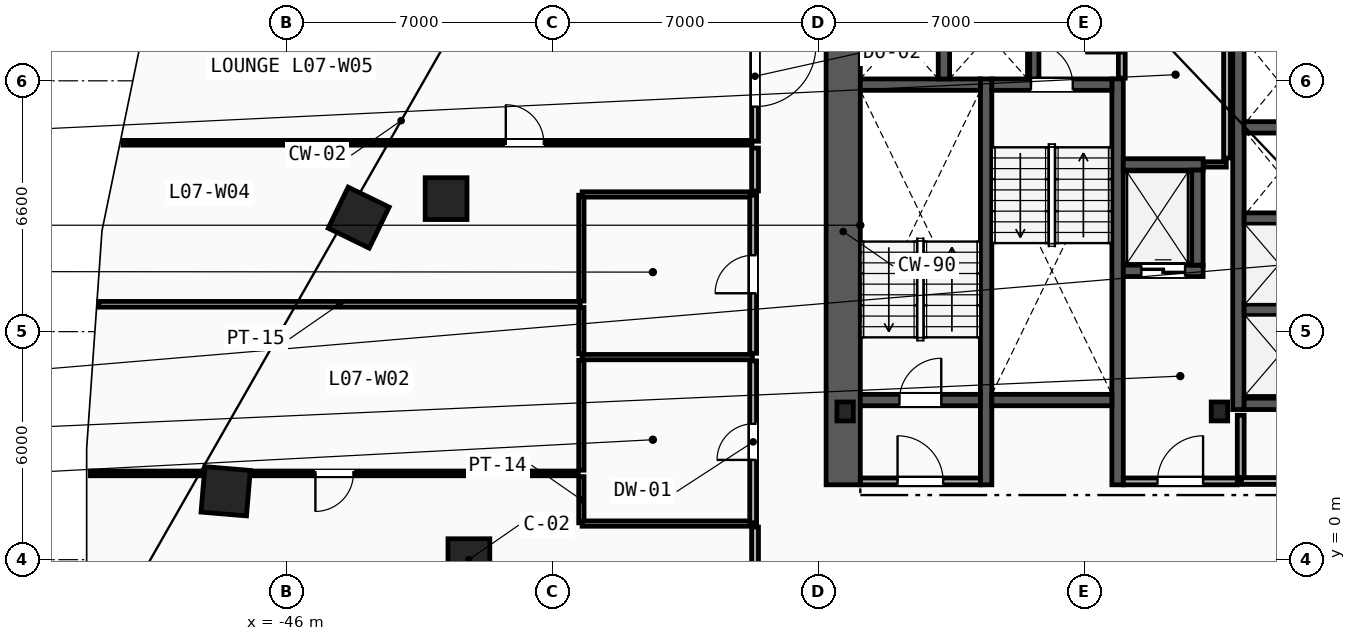
"""IFC4 building model, lengths in metres.
Left out: names, types, materials, properties, quantities, classifications, styles, units other than length and angle.
Written with IfcOpenShell. Run it as: python <this file> out.ifc"""

import sys

from ifc_helpers import new_model, si_unit, direction, frame, frame_2d, origin, origin_2d, place, context, subcontext, project, spatial, rectangle, i_section, extrude, element, fill, save


model = new_model("IFC4")
c1 = context("Model", 3, precision=1e-05, world=origin(), true_north=direction((0.0, 1.0)))
c2 = subcontext(c1, "Body", "Model", "MODEL_VIEW")
j1 = project(units=[si_unit("LENGTHUNIT", "METRE"), si_unit("PLANEANGLEUNIT", "RADIAN")], contexts=[c1])
p1 = place(None, origin())
s1 = spatial("IfcSite", under=j1, at=p1, CompositionType="ELEMENT")
p2 = place(p1, origin())
s2 = spatial("IfcBuilding", under=s1, at=p2, CompositionType="ELEMENT")
p3 = place(p2, frame((0.0, 0.0, 31.6)))
s3 = spatial("IfcBuildingStorey", under=s2, at=p3, CompositionType="ELEMENT", Elevation=31.6)
for number, where, z_axis, x_axis in (
    (1, (-31.3, 3.9, 0.0), (0.0, 0.0, 1.0), (1.0, 0.0, 0.0)),
    (2, (-21.45, 3.9, 0.0), (0.0, 0.0, 1.0), (1.0, 0.0, 0.0)),
):
    element("IfcColumn", number, at=place(p3, frame(where, z_axis=z_axis, x_axis=x_axis)), inside=s3, PredefinedType="COLUMN", context=c2, shape_type="SweptSolid", body=[
        extrude(i_section(OverallWidth=0.432, OverallDepth=0.498, WebThickness=0.056, FlangeThickness=0.089, FilletRadius=0.018, at=origin_2d()), origin(), (0.0, 0.0, 1.0), 3.8),
    ])
for number, where, z_axis, x_axis in (
    (3, (-41.2, 0.0, 0.0), (0.0, 0.0, 1.0), (1.0, 0.0, 0.0)),
    (4, (-41.8, 9.5, 0.0), (0.0, 0.0, 1.0), (1.0, 0.0, 0.0)),
):
    element("IfcColumn", number, at=place(p3, frame(where, z_axis=z_axis, x_axis=x_axis)), inside=s3, PredefinedType="COLUMN", context=c2, shape_type="SweptSolid", body=[
        extrude(rectangle(XDim=1.1, YDim=1.1, at=origin_2d()), origin(), (0.0, 0.0, 1.0), 3.8),
    ])
for number, where, z_axis, x_axis in (
    (5, (-44.1, 9.0, 0.0), (0.0, 0.0, 1.0), (-0.437, -0.899, 0.0)),
    (6, (-47.6, 1.8, 0.0), (0.0, 0.0, 1.0), (-0.084, -0.997, 0.0)),
):
    element("IfcColumn", number, at=place(p3, frame(where, z_axis=z_axis, x_axis=x_axis)), inside=s3, PredefinedType="COLUMN", context=c2, shape_type="SweptSolid", body=[
        extrude(rectangle(XDim=1.2, YDim=1.2, at=origin_2d()), origin(), (0.0, 0.0, 1.0), 3.8),
    ])
p4 = place(p3, frame((-31.35, 1.97, 0.0), z_axis=(0.0, 0.0, 1.0), x_axis=(0.0, 1.0, 0.0)))
e7 = element("IfcWall", 7, at=p4, inside=s3, PredefinedType="SHEAR", context=c2, shape_type="SweptSolid", body=[
    extrude(rectangle(XDim=13.33, YDim=0.9, at=frame_2d((6.665, 0.0))), origin(), (0.0, 0.0, 1.0), 3.5),
])
for number, where, z_axis, x_axis in (
    (8, (-27.59, 1.97, 0.0), (0.0, 0.0, 1.0), (0.0, 1.0, 0.0)),
    (9, (-24.13, 1.97, 0.0), (0.0, 0.0, 1.0), (0.0, 1.0, 0.0)),
):
    element("IfcWall", number, at=place(p3, frame(where, z_axis=z_axis, x_axis=x_axis)), inside=s3, PredefinedType="SHEAR", context=c2, shape_type="SweptSolid", body=[
        extrude(rectangle(XDim=10.68, YDim=0.3, at=frame_2d((5.34, 0.0))), origin(), (0.0, 0.0, 1.0), 3.5),
    ])
p5 = place(p3, frame((-30.9, 4.2, 0.0), z_axis=(0.0, 0.0, 1.0), x_axis=(1.0, 0.0, 0.0)))
e10 = element("IfcWall", 10, at=p5, inside=s3, PredefinedType="SHEAR", context=c2, shape_type="SweptSolid", body=[
    extrude(rectangle(XDim=3.16, YDim=0.3, at=frame_2d((1.58, 0.0))), origin(), (0.0, 0.0, 1.0), 3.5),
])
p6 = place(p5, frame((1.03, 0.0, 0.0)))
e11 = element("IfcOpeningElement", 11, at=p6, cuts=e10, PredefinedType="OPENING", context=c2, shape_type="SweptSolid", body=[
    extrude(rectangle(XDim=1.1, YDim=2.15, at=frame_2d((0.55, 1.075))), frame((0.0, 0.16, 0.0), z_axis=(0.0, -1.0, 0.0), x_axis=(1.0, 0.0, 0.0)), (0.0, 0.0, 1.0), 0.32),
])
p7 = place(p3, frame((-30.9, 12.5, 0.0), z_axis=(0.0, 0.0, 1.0), x_axis=(1.0, 0.0, 0.0)))
e12 = element("IfcWall", 12, at=p7, inside=s3, PredefinedType="SHEAR", context=c2, shape_type="SweptSolid", body=[
    extrude(rectangle(XDim=3.16, YDim=0.3, at=frame_2d((1.58, 0.0))), origin(), (0.0, 0.0, 1.0), 3.5),
])
p8 = place(p3, frame((-27.44, 12.5, 0.0), z_axis=(0.0, 0.0, 1.0), x_axis=(1.0, 0.0, 0.0)))
e13 = element("IfcWall", 13, at=p8, inside=s3, PredefinedType="SHEAR", context=c2, shape_type="SweptSolid", body=[
    extrude(rectangle(XDim=3.16, YDim=0.3, at=frame_2d((1.58, 0.0))), origin(), (0.0, 0.0, 1.0), 3.5),
])
p9 = place(p8, frame((1.03, 0.0, 0.0)))
e14 = element("IfcOpeningElement", 14, at=p9, cuts=e13, PredefinedType="OPENING", context=c2, shape_type="SweptSolid", body=[
    extrude(rectangle(XDim=1.1, YDim=2.15, at=frame_2d((0.55, 1.075))), frame((0.0, 0.16, 0.0), z_axis=(0.0, -1.0, 0.0), x_axis=(1.0, 0.0, 0.0)), (0.0, 0.0, 1.0), 0.32),
])
p10 = place(p3, frame((-27.44, 4.2, 0.0), z_axis=(0.0, 0.0, 1.0), x_axis=(1.0, 0.0, 0.0)))
e15 = element("IfcWall", 15, at=p10, inside=s3, PredefinedType="SHEAR", context=c2, shape_type="SweptSolid", body=[
    extrude(rectangle(XDim=3.16, YDim=0.3, at=frame_2d((1.58, 0.0))), origin(), (0.0, 0.0, 1.0), 3.5),
])
p11 = place(p3, frame((-20.89, 2.15, 0.0), z_axis=(0.0, 0.0, 1.0), x_axis=(0.0, 1.0, 0.0)))
e16 = element("IfcWall", 16, at=p11, inside=s3, PredefinedType="PARTITIONING", context=c2, shape_type="SweptSolid", body=[
    extrude(rectangle(XDim=1.65, YDim=0.18, at=frame_2d((0.825, 0.0))), origin(), (0.0, 0.0, 1.0), 3.5),
])
p12 = place(p3, frame((-23.98, 2.06, 0.0), z_axis=(0.0, 0.0, 1.0), x_axis=(1.0, 0.0, 0.0)))
e17 = element("IfcWall", 17, at=p12, inside=s3, PredefinedType="PARTITIONING", context=c2, shape_type="SweptSolid", body=[
    extrude(rectangle(XDim=3.0, YDim=0.18, at=frame_2d((1.5, 0.0))), origin(), (0.0, 0.0, 1.0), 3.5),
])
p13 = place(p12, frame((0.9, 0.0, 0.0)))
e18 = element("IfcOpeningElement", 18, at=p13, cuts=e17, PredefinedType="OPENING", context=c2, shape_type="SweptSolid", body=[
    extrude(rectangle(XDim=1.2, YDim=2.15, at=frame_2d((0.6, 1.075))), frame((0.0, 0.1, 0.0), z_axis=(0.0, -1.0, 0.0), x_axis=(1.0, 0.0, 0.0)), (0.0, 0.0, 1.0), 0.2),
])
p14 = place(p3, frame((-30.9, 2.06, 0.0), z_axis=(0.0, 0.0, 1.0), x_axis=(1.0, 0.0, 0.0)))
e19 = element("IfcWall", 19, at=p14, inside=s3, PredefinedType="PARTITIONING", context=c2, shape_type="SweptSolid", body=[
    extrude(rectangle(XDim=3.16, YDim=0.18, at=frame_2d((1.58, 0.0))), origin(), (0.0, 0.0, 1.0), 3.5),
])
p15 = place(p14, frame((0.98, 0.0, 0.0)))
e20 = element("IfcOpeningElement", 20, at=p15, cuts=e19, PredefinedType="OPENING", context=c2, shape_type="SweptSolid", body=[
    extrude(rectangle(XDim=1.2, YDim=2.15, at=frame_2d((0.6, 1.075))), frame((0.0, 0.1, 0.0), z_axis=(0.0, -1.0, 0.0), x_axis=(1.0, 0.0, 0.0)), (0.0, 0.0, 1.0), 0.2),
])
p16 = place(p3, frame((-23.98, 7.6, 0.0), z_axis=(0.0, 0.0, 1.0), x_axis=(1.0, 0.0, 0.0)))
e21 = element("IfcWall", 21, at=p16, inside=s3, PredefinedType="SHEAR", context=c2, shape_type="SweptSolid", body=[
    extrude(rectangle(XDim=2.1, YDim=0.3, at=frame_2d((1.05, 0.0))), origin(), (0.0, 0.0, 1.0), 3.5),
])
p17 = place(p16, frame((0.475, 0.0, 0.0)))
e22 = element("IfcOpeningElement", 22, at=p17, cuts=e21, PredefinedType="OPENING", context=c2, shape_type="SweptSolid", body=[
    extrude(rectangle(XDim=1.15, YDim=2.2, at=frame_2d((0.575, 1.1))), frame((0.0, 0.16, 0.0), z_axis=(0.0, -1.0, 0.0), x_axis=(1.0, 0.0, 0.0)), (0.0, 0.0, 1.0), 0.32),
])
p18 = place(p3, frame((-23.98, 10.4, 0.0), z_axis=(0.0, 0.0, 1.0), x_axis=(1.0, 0.0, 0.0)))
e23 = element("IfcWall", 23, at=p18, inside=s3, PredefinedType="SHEAR", context=c2, shape_type="SweptSolid", body=[
    extrude(rectangle(XDim=2.1, YDim=0.3, at=frame_2d((1.05, 0.0))), origin(), (0.0, 0.0, 1.0), 3.5),
])
p19 = place(p3, frame((-22.03, 7.75, 0.0), z_axis=(0.0, 0.0, 1.0), x_axis=(0.0, 1.0, 0.0)))
e24 = element("IfcWall", 24, at=p19, inside=s3, PredefinedType="SHEAR", context=c2, shape_type="SweptSolid", body=[
    extrude(rectangle(XDim=2.5, YDim=0.3, at=frame_2d((1.25, 0.0))), origin(), (0.0, 0.0, 1.0), 3.5),
])
for number, where, z_axis, x_axis in (
    (25, (-28.7, 12.65, 0.0), (0.0, 0.0, 1.0), (0.0, 1.0, 0.0)),
    (26, (-26.35, 12.65, 0.0), (0.0, 0.0, 1.0), (0.0, 1.0, 0.0)),
):
    element("IfcWall", number, at=place(p3, frame(where, z_axis=z_axis, x_axis=x_axis)), inside=s3, PredefinedType="SHEAR", context=c2, shape_type="SweptSolid", body=[
        extrude(rectangle(XDim=2.3, YDim=0.3, at=frame_2d((1.15, 0.0))), origin(), (0.0, 0.0, 1.0), 3.5),
    ])
p20 = place(p3, frame((-20.95, 3.95, 0.0), z_axis=(0.0, 0.0, 1.0), x_axis=(0.0, 1.0, 0.0)))
e27 = element("IfcWall", 27, at=p20, inside=s3, PredefinedType="SHEAR", context=c2, shape_type="SweptSolid", body=[
    extrude(rectangle(XDim=10.05, YDim=0.3, at=frame_2d((5.025, 0.0))), origin(), (0.0, 0.0, 1.0), 3.5),
])
p21 = place(p3, frame((-20.8, 4.1, 0.0), z_axis=(0.0, 0.0, 1.0), x_axis=(1.0, 0.0, 0.0)))
e28 = element("IfcWall", 28, at=p21, inside=s3, PredefinedType="SHEAR", context=c2, shape_type="SweptSolid", body=[
    extrude(rectangle(XDim=2.15, YDim=0.3, at=frame_2d((1.075, 0.0))), origin(), (0.0, 0.0, 1.0), 3.5),
])
for number, where, z_axis, x_axis in (
    (29, (-20.8, 6.575, 0.0), (0.0, 0.0, 1.0), (1.0, 0.0, 0.0)),
    (30, (-20.8, 8.975, 0.0), (0.0, 0.0, 1.0), (1.0, 0.0, 0.0)),
    (31, (-20.8, 11.375, 0.0), (0.0, 0.0, 1.0), (1.0, 0.0, 0.0)),
):
    element("IfcWall", number, at=place(p3, frame(where, z_axis=z_axis, x_axis=x_axis)), inside=s3, PredefinedType="SHEAR", context=c2, shape_type="SweptSolid", body=[
        extrude(rectangle(XDim=1.85, YDim=0.3, at=frame_2d((0.925, 0.0))), origin(), (0.0, 0.0, 1.0), 3.5),
    ])
p22 = place(p3, frame((-20.87, 2.07, 0.0), z_axis=(0.0, 0.0, 1.0), x_axis=(1.0, 0.0, 0.0)))
e32 = element("IfcWall", 32, at=p22, inside=s3, PredefinedType="PARTITIONING", context=c2, shape_type="SweptSolid", body=[
    extrude(rectangle(XDim=3.83, YDim=0.18, at=frame_2d((1.915, 0.0))), origin(), (0.0, 0.0, 1.0), 3.5),
])
p23 = place(p22, frame((1.44, 0.0, 0.0)))
e33 = element("IfcOpeningElement", 33, at=p23, cuts=e32, PredefinedType="OPENING", context=c2, shape_type="SweptSolid", body=[
    extrude(rectangle(XDim=0.95, YDim=2.1, at=frame_2d((0.475, 1.05))), frame((0.0, 0.1, 0.0), z_axis=(0.0, -1.0, 0.0), x_axis=(1.0, 0.0, 0.0)), (0.0, 0.0, 1.0), 0.2),
])
p24 = place(p3, frame((-21.86, 10.4, 0.0), z_axis=(0.0, 0.0, 1.0), x_axis=(1.0, 0.0, 0.0)))
e34 = element("IfcWall", 34, at=p24, inside=s3, PredefinedType="PARTITIONING", context=c2, shape_type="SweptSolid", body=[
    extrude(rectangle(XDim=0.59, YDim=0.14, at=frame_2d((0.295, 0.0))), origin(), (0.0, 0.0, 1.0), 3.5),
])
p25 = place(p3, frame((-21.25, 10.57, 0.0), z_axis=(0.0, 0.0, 1.0), x_axis=(0.0, 1.0, 0.0)))
e35 = element("IfcWall", 35, at=p25, inside=s3, PredefinedType="PARTITIONING", context=c2, shape_type="SweptSolid", body=[
    extrude(rectangle(XDim=4.36, YDim=0.18, at=frame_2d((2.18, 0.0))), origin(), (0.0, 0.0, 1.0), 3.5),
])
p26 = place(p3, frame((-24.02, 12.67, 0.0), z_axis=(0.0, 0.0, 1.0), x_axis=(0.0, 1.0, 0.0)))
e36 = element("IfcWall", 36, at=p26, inside=s3, PredefinedType="PARTITIONING", context=c2, shape_type="SweptSolid", body=[
    extrude(rectangle(XDim=2.26, YDim=0.18, at=frame_2d((1.13, 0.0))), origin(), (0.0, 0.0, 1.0), 3.5),
])
p27 = place(p26, frame((0.655, 0.0, 0.0)))
e37 = element("IfcOpeningElement", 37, at=p27, cuts=e36, PredefinedType="OPENING", context=c2, shape_type="SweptSolid", body=[
    extrude(rectangle(XDim=0.95, YDim=2.1, at=frame_2d((0.475, 1.05))), frame((0.0, 0.1, 0.0), z_axis=(0.0, -1.0, 0.0), x_axis=(1.0, 0.0, 0.0)), (0.0, 0.0, 1.0), 0.2),
])
p28 = place(p3, frame((-38.24, 0.97, 0.0), z_axis=(0.0, 0.0, 1.0), x_axis=(0.0, 1.0, 0.0)))
e38 = element("IfcWall", 38, at=p28, inside=s3, PredefinedType="PARTITIONING", context=c2, shape_type="SweptSolid", body=[
    extrude(rectangle(XDim=1.215, YDim=0.14, at=frame_2d((0.607, 0.0))), origin(), (0.0, 0.0, 1.0), 3.5),
])
p29 = place(p3, frame((-38.24, 2.355, 0.0), z_axis=(0.0, 0.0, 1.0), x_axis=(0.0, 1.0, 0.0)))
e39 = element("IfcWall", 39, at=p29, inside=s3, PredefinedType="PARTITIONING", context=c2, shape_type="SweptSolid", body=[
    extrude(rectangle(XDim=2.89, YDim=0.14, at=frame_2d((1.445, 0.0))), origin(), (0.0, 0.0, 1.0), 3.5),
])
p30 = place(p3, frame((-38.24, 5.415, 0.0), z_axis=(0.0, 0.0, 1.0), x_axis=(0.0, 1.0, 0.0)))
e40 = element("IfcWall", 40, at=p30, inside=s3, PredefinedType="PARTITIONING", context=c2, shape_type="SweptSolid", body=[
    extrude(rectangle(XDim=1.22, YDim=0.14, at=frame_2d((0.61, 0.0))), origin(), (0.0, 0.0, 1.0), 3.5),
])
p31 = place(p3, frame((-38.24, 6.805, 0.0), z_axis=(0.0, 0.0, 1.0), x_axis=(0.0, 1.0, 0.0)))
e41 = element("IfcWall", 41, at=p31, inside=s3, PredefinedType="PARTITIONING", context=c2, shape_type="SweptSolid", body=[
    extrude(rectangle(XDim=2.785, YDim=0.14, at=frame_2d((1.393, 0.0))), origin(), (0.0, 0.0, 1.0), 3.5),
])
for number, where, z_axis, x_axis in (
    (42, (-38.22, 0.95, 0.0), (0.0, 0.0, 1.0), (1.0, 0.0, 0.0)),
    (43, (-38.22, 5.33, 0.0), (0.0, 0.0, 1.0), (1.0, 0.0, 0.0)),
    (44, (-38.22, 9.61, 0.0), (0.0, 0.0, 1.0), (1.0, 0.0, 0.0)),
):
    element("IfcWall", number, at=place(p3, frame(where, z_axis=z_axis, x_axis=x_axis)), inside=s3, PredefinedType="PARTITIONING", context=c2, shape_type="SweptSolid", body=[
        extrude(rectangle(XDim=4.48, YDim=0.14, at=frame_2d((2.24, 0.0))), origin(), (0.0, 0.0, 1.0), 3.5),
    ])
p32 = place(p3, frame((-33.72, 0.97, 0.0), z_axis=(0.0, 0.0, 1.0), x_axis=(0.0, 1.0, 0.0)))
e45 = element("IfcWall", 45, at=p32, inside=s3, PredefinedType="PARTITIONING", context=c2, shape_type="SweptSolid", body=[
    extrude(rectangle(XDim=4.26, YDim=0.18, at=frame_2d((2.13, 0.0))), origin(), (0.0, 0.0, 1.0), 3.5),
])
p33 = place(p32, frame((1.655, 0.0, 0.0)))
e46 = element("IfcOpeningElement", 46, at=p33, cuts=e45, PredefinedType="OPENING", context=c2, shape_type="SweptSolid", body=[
    extrude(rectangle(XDim=0.95, YDim=2.1, at=frame_2d((0.475, 1.05))), frame((0.0, 0.1, 0.0), z_axis=(0.0, -1.0, 0.0), x_axis=(1.0, 0.0, 0.0)), (0.0, 0.0, 1.0), 0.2),
])
p34 = place(p3, frame((-33.72, 5.43, 0.0), z_axis=(0.0, 0.0, 1.0), x_axis=(0.0, 1.0, 0.0)))
e47 = element("IfcWall", 47, at=p34, inside=s3, PredefinedType="PARTITIONING", context=c2, shape_type="SweptSolid", body=[
    extrude(rectangle(XDim=4.16, YDim=0.18, at=frame_2d((2.08, 0.0))), origin(), (0.0, 0.0, 1.0), 3.5),
])
p35 = place(p34, frame((1.58, 0.0, 0.0)))
e48 = element("IfcOpeningElement", 48, at=p35, cuts=e47, PredefinedType="OPENING", context=c2, shape_type="SweptSolid", body=[
    extrude(rectangle(XDim=1.0, YDim=2.15, at=frame_2d((0.5, 1.075))), frame((0.0, 0.1, 0.0), z_axis=(0.0, -1.0, 0.0), x_axis=(1.0, 0.0, 0.0)), (0.0, 0.0, 1.0), 0.2),
])
p36 = place(p3, frame((-50.941, 6.72, 0.0), z_axis=(0.0, 0.0, 1.0), x_axis=(1.0, 0.0, 0.0)))
e49 = element("IfcWall", 49, at=p36, inside=s3, PredefinedType="PARTITIONING", context=c2, shape_type="SweptSolid", body=[
    extrude(rectangle(XDim=12.671, YDim=0.15, at=frame_2d((6.335, 0.0))), origin(), (0.0, 0.0, 1.0), 3.5),
])
p37 = place(p3, frame((-33.67, 0.859, 0.0), z_axis=(0.0, 0.0, 1.0), x_axis=(0.0, -1.0, 0.0)))
e50 = element("IfcWall", 50, at=p37, inside=s3, PredefinedType="PARTITIONING", context=c2, shape_type="SweptSolid", body=[
    extrude(rectangle(XDim=12.259, YDim=0.18, at=frame_2d((6.129, 0.0))), origin(), (0.0, 0.0, 1.0), 3.5),
])
p38 = place(p3, frame((-33.67, 10.83, 0.0), z_axis=(0.0, 0.0, 1.0), x_axis=(0.0, -1.0, 0.0)))
e51 = element("IfcWall", 51, at=p38, inside=s3, PredefinedType="PARTITIONING", context=c2, shape_type="SweptSolid", body=[
    extrude(rectangle(XDim=1.129, YDim=0.18, at=frame_2d((0.564, 0.0))), origin(), (0.0, 0.0, 1.0), 3.5),
])
p39 = place(p3, frame((-33.67, 14.43, 0.0), z_axis=(0.0, 0.0, 1.0), x_axis=(0.0, -1.0, 0.0)))
e52 = element("IfcWall", 52, at=p39, inside=s3, PredefinedType="PARTITIONING", context=c2, shape_type="SweptSolid", body=[
    extrude(rectangle(XDim=3.42, YDim=0.18, at=frame_2d((1.71, 0.0))), origin(), (0.0, 0.0, 1.0), 3.5),
])
p40 = place(p39, frame((0.91, 0.0, 0.0)))
e53 = element("IfcOpeningElement", 53, at=p40, cuts=e52, PredefinedType="OPENING", context=c2, shape_type="SweptSolid", body=[
    extrude(rectangle(XDim=1.6, YDim=2.2, at=frame_2d((0.8, 1.1))), frame((0.0, 0.1, 0.0), z_axis=(0.0, -1.0, 0.0), x_axis=(1.0, 0.0, 0.0)), (0.0, 0.0, 1.0), 0.2),
])
p41 = place(p3, frame((-38.32, 2.27, 0.0), z_axis=(0.0, 0.0, 1.0), x_axis=(-1.0, 0.0, 0.0)))
e54 = element("IfcWall", 54, at=p41, inside=s3, PredefinedType="PARTITIONING", context=c2, shape_type="SweptSolid", body=[
    extrude(rectangle(XDim=12.838, YDim=0.125, at=frame_2d((6.419, 0.0))), origin(), (0.0, 0.0, 1.0), 3.5),
])
p42 = place(p41, frame((5.919, 0.0, 0.0)))
e55 = element("IfcOpeningElement", 55, at=p42, cuts=e54, PredefinedType="OPENING", context=c2, shape_type="SweptSolid", body=[
    extrude(rectangle(XDim=1.0, YDim=2.15, at=frame_2d((0.5, 1.075))), frame((0.0, 0.073, 0.0), z_axis=(0.0, -1.0, 0.0), x_axis=(1.0, 0.0, 0.0)), (0.0, 0.0, 1.0), 0.145),
])
p43 = place(p3, frame((-50.302, 10.97, 0.0), z_axis=(0.0, 0.0, 1.0), x_axis=(1.0, 0.0, 0.0)))
e56 = element("IfcWall", 56, at=p43, inside=s3, PredefinedType="PARTITIONING", context=c2, shape_type="SweptSolid", body=[
    extrude(rectangle(XDim=16.552, YDim=0.125, at=frame_2d((8.276, 0.0))), origin(), (0.0, 0.0, 1.0), 3.5),
])
p44 = place(p43, frame((10.073, 0.0, 0.0)))
e57 = element("IfcOpeningElement", 57, at=p44, cuts=e56, PredefinedType="OPENING", context=c2, shape_type="SweptSolid", body=[
    extrude(rectangle(XDim=1.0, YDim=2.15, at=frame_2d((0.5, 1.075))), frame((0.0, 0.073, 0.0), z_axis=(0.0, -1.0, 0.0), x_axis=(1.0, 0.0, 0.0)), (0.0, 0.0, 1.0), 0.145),
])
p45 = place(p6, origin())
e58 = element("IfcDoor", 58, at=p45, inside=s3, OperationType="SINGLE_SWING_RIGHT", PredefinedType="DOOR", context=c2, shape_type="SweptSolid", body=[
    extrude(rectangle(XDim=1.1, YDim=2.15, at=frame_2d((0.55, 1.075))), frame((0.0, 0.025, 0.0), z_axis=(0.0, -1.0, 0.0), x_axis=(1.0, 0.0, 0.0)), (0.0, 0.0, 1.0), 0.05),
])
fill(e11, e58)
p46 = place(p9, origin())
e59 = element("IfcDoor", 59, at=p46, inside=s3, OperationType="SINGLE_SWING_LEFT", PredefinedType="DOOR", context=c2, shape_type="SweptSolid", body=[
    extrude(rectangle(XDim=1.1, YDim=2.15, at=frame_2d((0.55, 1.075))), frame((0.0, 0.025, 0.0), z_axis=(0.0, -1.0, 0.0), x_axis=(1.0, 0.0, 0.0)), (0.0, 0.0, 1.0), 0.05),
])
fill(e14, e59)
p47 = place(p13, origin())
e60 = element("IfcDoor", 60, at=p47, inside=s3, OperationType="SINGLE_SWING_RIGHT", PredefinedType="DOOR", context=c2, shape_type="SweptSolid", body=[
    extrude(rectangle(XDim=1.2, YDim=2.15, at=frame_2d((0.6, 1.075))), frame((0.0, 0.025, 0.0), z_axis=(0.0, -1.0, 0.0), x_axis=(1.0, 0.0, 0.0)), (0.0, 0.0, 1.0), 0.05),
])
fill(e18, e60)
p48 = place(p15, origin())
e61 = element("IfcDoor", 61, at=p48, inside=s3, OperationType="SINGLE_SWING_LEFT", PredefinedType="DOOR", context=c2, shape_type="SweptSolid", body=[
    extrude(rectangle(XDim=1.2, YDim=2.15, at=frame_2d((0.6, 1.075))), frame((0.0, 0.025, 0.0), z_axis=(0.0, -1.0, 0.0), x_axis=(1.0, 0.0, 0.0)), (0.0, 0.0, 1.0), 0.05),
])
fill(e20, e61)
p49 = place(p17, origin())
e62 = element("IfcDoor", 62, at=p49, inside=s3, OperationType="SLIDING_TO_LEFT", PredefinedType="TRAPDOOR", context=c2, shape_type="SweptSolid", body=[
    extrude(rectangle(XDim=1.15, YDim=2.2, at=frame_2d((0.575, 1.1))), frame((0.0, 0.025, 0.0), z_axis=(0.0, -1.0, 0.0), x_axis=(1.0, 0.0, 0.0)), (0.0, 0.0, 1.0), 0.05),
])
fill(e22, e62)
p50 = place(p44, origin())
e63 = element("IfcDoor", 63, at=p50, inside=s3, OperationType="SINGLE_SWING_LEFT", PredefinedType="DOOR", context=c2, shape_type="SweptSolid", body=[
    extrude(rectangle(XDim=1.0, YDim=2.15, at=frame_2d((0.5, 1.075))), frame((0.0, 0.025, 0.0), z_axis=(0.0, -1.0, 0.0), x_axis=(1.0, 0.0, 0.0)), (0.0, 0.0, 1.0), 0.05),
])
fill(e57, e63)
p51 = place(p42, origin())
e64 = element("IfcDoor", 64, at=p51, inside=s3, OperationType="SINGLE_SWING_RIGHT", PredefinedType="DOOR", context=c2, shape_type="SweptSolid", body=[
    extrude(rectangle(XDim=1.0, YDim=2.15, at=frame_2d((0.5, 1.075))), frame((0.0, 0.025, 0.0), z_axis=(0.0, -1.0, 0.0), x_axis=(1.0, 0.0, 0.0)), (0.0, 0.0, 1.0), 0.05),
])
fill(e55, e64)
p52 = place(p33, origin())
e65 = element("IfcDoor", 65, at=p52, inside=s3, OperationType="SINGLE_SWING_LEFT", PredefinedType="DOOR", context=c2, shape_type="SweptSolid", body=[
    extrude(rectangle(XDim=0.95, YDim=2.1, at=frame_2d((0.475, 1.05))), frame((0.0, 0.025, 0.0), z_axis=(0.0, -1.0, 0.0), x_axis=(1.0, 0.0, 0.0)), (0.0, 0.0, 1.0), 0.05),
])
fill(e46, e65)
p53 = place(p35, origin())
e66 = element("IfcDoor", 66, at=p53, inside=s3, OperationType="SINGLE_SWING_LEFT", PredefinedType="DOOR", context=c2, shape_type="SweptSolid", body=[
    extrude(rectangle(XDim=1.0, YDim=2.15, at=frame_2d((0.5, 1.075))), frame((0.0, 0.025, 0.0), z_axis=(0.0, -1.0, 0.0), x_axis=(1.0, 0.0, 0.0)), (0.0, 0.0, 1.0), 0.05),
])
fill(e48, e66)
p54 = place(p40, origin())
e67 = element("IfcDoor", 67, at=p54, inside=s3, OperationType="SINGLE_SWING_LEFT", PredefinedType="DOOR", context=c2, shape_type="SweptSolid", body=[
    extrude(rectangle(XDim=1.6, YDim=2.2, at=frame_2d((0.8, 1.1))), frame((0.0, 0.025, 0.0), z_axis=(0.0, -1.0, 0.0), x_axis=(1.0, 0.0, 0.0)), (0.0, 0.0, 1.0), 0.05),
])
fill(e53, e67)
p55 = place(p27, origin())
e68 = element("IfcDoor", 68, at=p55, inside=s3, OperationType="SINGLE_SWING_LEFT", PredefinedType="DOOR", context=c2, shape_type="SweptSolid", body=[
    extrude(rectangle(XDim=0.95, YDim=2.1, at=frame_2d((0.475, 1.05))), frame((0.0, 0.025, 0.0), z_axis=(0.0, -1.0, 0.0), x_axis=(1.0, 0.0, 0.0)), (0.0, 0.0, 1.0), 0.05),
])
fill(e37, e68)
save(model, sys.argv[1])
